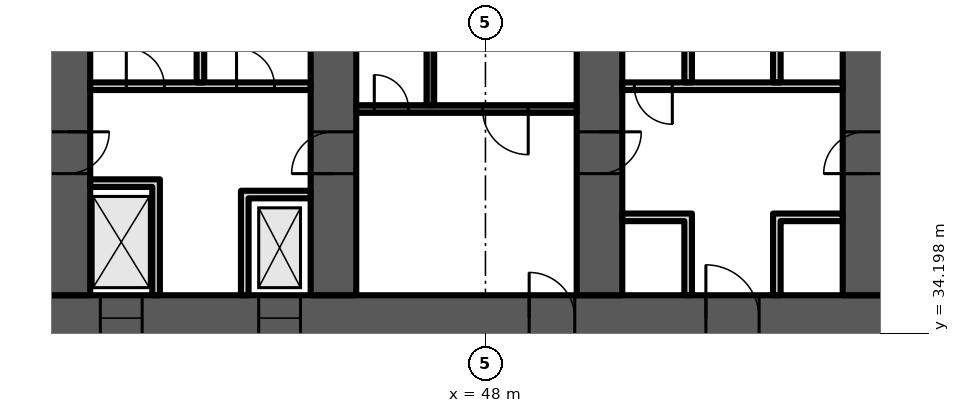
"""IFC4 building model, lengths in metres.
Left out: names, types, materials, properties, quantities, classifications, styles, units other than length and angle.
Written with IfcOpenShell. Run it as: python <this file> out.ifc"""

import sys

from ifc_helpers import new_model, si_unit, direction, frame, frame_2d, origin, place, context, subcontext, project, spatial, polyline, rectangle, outline, extrude, element, fill, save


model = new_model("IFC4")
c1 = context("Model", 3, precision=1e-05, world=origin(), true_north=direction((0.0, 1.0)))
c2 = subcontext(c1, "Body", "Model", "MODEL_VIEW")
j1 = project(units=[si_unit("LENGTHUNIT", "METRE"), si_unit("PLANEANGLEUNIT", "RADIAN")], contexts=[c1])
p1 = place(None, origin())
s1 = spatial("IfcSite", under=j1, at=p1, CompositionType="ELEMENT")
p2 = place(p1, origin())
s2 = spatial("IfcBuilding", under=s1, at=p2, CompositionType="ELEMENT")
p3 = place(p2, frame((0.0, 0.0, 91.9)))
s3 = spatial("IfcBuildingStorey", under=s2, at=p3, CompositionType="ELEMENT", Elevation=91.9)
p4 = place(p3, frame((9.0, 34.6, 0.0), z_axis=(0.0, 0.0, 1.0), x_axis=(1.0, 0.0, 0.0)))
e1 = element("IfcWall", 1, at=p4, inside=s3, PredefinedType="SHEAR", context=c2, shape_type="SweptSolid", body=[
    extrude(rectangle(XDim=56.0, YDim=1.2, at=frame_2d((28.0, 0.0))), origin(), (0.0, 0.0, 1.0), 4.8),
])
p5 = place(p4, frame((3.3, 0.0, 0.0)))
e2 = element("IfcOpeningElement", 2, at=p5, cuts=e1, PredefinedType="OPENING", context=c2, shape_type="SweptSolid", body=[
    extrude(rectangle(XDim=1.0, YDim=2.1, at=frame_2d((0.5, 1.05))), frame((0.0, 0.61, 0.0), z_axis=(0.0, -1.0, 0.0), x_axis=(1.0, 0.0, 0.0)), (0.0, 0.0, 1.0), 1.22),
])
p6 = place(p4, frame((7.867, 0.0, 0.0)))
e3 = element("IfcOpeningElement", 3, at=p6, cuts=e1, PredefinedType="OPENING", context=c2, shape_type="SweptSolid", body=[
    extrude(rectangle(XDim=1.1, YDim=2.1, at=frame_2d((0.55, 1.05))), frame((0.0, 0.61, 0.0), z_axis=(0.0, -1.0, 0.0), x_axis=(1.0, 0.0, 0.0)), (0.0, 0.0, 1.0), 1.22),
])
p7 = place(p4, frame((12.033, 0.0, 0.0)))
e4 = element("IfcOpeningElement", 4, at=p7, cuts=e1, PredefinedType="OPENING", context=c2, shape_type="SweptSolid", body=[
    extrude(rectangle(XDim=1.1, YDim=2.1, at=frame_2d((0.55, 1.05))), frame((0.0, 0.61, 0.0), z_axis=(0.0, -1.0, 0.0), x_axis=(1.0, 0.0, 0.0)), (0.0, 0.0, 1.0), 1.22),
])
p8 = place(p4, frame((9.8, 0.0, 0.0)))
e5 = element("IfcOpeningElement", 5, at=p8, cuts=e1, PredefinedType="OPENING", context=c2, shape_type="SweptSolid", body=[
    extrude(rectangle(XDim=1.4, YDim=2.1, at=frame_2d((0.7, 1.05))), frame((0.0, 0.61, 0.0), z_axis=(0.0, -1.0, 0.0), x_axis=(1.0, 0.0, 0.0)), (0.0, 0.0, 1.0), 1.22),
])
p9 = place(p4, frame((14.65, 0.0, 0.0)))
e6 = element("IfcOpeningElement", 6, at=p9, cuts=e1, PredefinedType="OPENING", context=c2, shape_type="SweptSolid", body=[
    extrude(rectangle(XDim=1.2, YDim=2.1, at=frame_2d((0.6, 1.05))), frame((0.0, 0.61, 0.0), z_axis=(0.0, -1.0, 0.0), x_axis=(1.0, 0.0, 0.0)), (0.0, 0.0, 1.0), 1.22),
])
p10 = place(p4, frame((21.867, 0.0, 0.0)))
e7 = element("IfcOpeningElement", 7, at=p10, cuts=e1, PredefinedType="OPENING", context=c2, shape_type="SweptSolid", body=[
    extrude(rectangle(XDim=1.1, YDim=2.1, at=frame_2d((0.55, 1.05))), frame((0.0, 0.61, 0.0), z_axis=(0.0, -1.0, 0.0), x_axis=(1.0, 0.0, 0.0)), (0.0, 0.0, 1.0), 1.22),
])
p11 = place(p4, frame((26.033, 0.0, 0.0)))
e8 = element("IfcOpeningElement", 8, at=p11, cuts=e1, PredefinedType="OPENING", context=c2, shape_type="SweptSolid", body=[
    extrude(rectangle(XDim=1.1, YDim=2.1, at=frame_2d((0.55, 1.05))), frame((0.0, 0.61, 0.0), z_axis=(0.0, -1.0, 0.0), x_axis=(1.0, 0.0, 0.0)), (0.0, 0.0, 1.0), 1.22),
])
p12 = place(p4, frame((23.8, 0.0, 0.0)))
e9 = element("IfcOpeningElement", 9, at=p12, cuts=e1, PredefinedType="OPENING", context=c2, shape_type="SweptSolid", body=[
    extrude(rectangle(XDim=1.4, YDim=2.1, at=frame_2d((0.7, 1.05))), frame((0.0, 0.61, 0.0), z_axis=(0.0, -1.0, 0.0), x_axis=(1.0, 0.0, 0.0)), (0.0, 0.0, 1.0), 1.22),
])
p13 = place(p4, frame((28.867, 0.0, 0.0)))
e10 = element("IfcOpeningElement", 10, at=p13, cuts=e1, PredefinedType="OPENING", context=c2, shape_type="SweptSolid", body=[
    extrude(rectangle(XDim=1.1, YDim=2.1, at=frame_2d((0.55, 1.05))), frame((0.0, 0.61, 0.0), z_axis=(0.0, -1.0, 0.0), x_axis=(1.0, 0.0, 0.0)), (0.0, 0.0, 1.0), 1.22),
])
p14 = place(p4, frame((33.033, 0.0, 0.0)))
e11 = element("IfcOpeningElement", 11, at=p14, cuts=e1, PredefinedType="OPENING", context=c2, shape_type="SweptSolid", body=[
    extrude(rectangle(XDim=1.1, YDim=2.1, at=frame_2d((0.55, 1.05))), frame((0.0, 0.61, 0.0), z_axis=(0.0, -1.0, 0.0), x_axis=(1.0, 0.0, 0.0)), (0.0, 0.0, 1.0), 1.22),
])
p15 = place(p4, frame((40.15, 0.0, 0.0)))
e12 = element("IfcOpeningElement", 12, at=p15, cuts=e1, PredefinedType="OPENING", context=c2, shape_type="SweptSolid", body=[
    extrude(rectangle(XDim=1.2, YDim=2.1, at=frame_2d((0.6, 1.05))), frame((0.0, 0.61, 0.0), z_axis=(0.0, -1.0, 0.0), x_axis=(1.0, 0.0, 0.0)), (0.0, 0.0, 1.0), 1.22),
])
p16 = place(p4, frame((44.8, 0.0, 0.0)))
e13 = element("IfcOpeningElement", 13, at=p16, cuts=e1, PredefinedType="OPENING", context=c2, shape_type="SweptSolid", body=[
    extrude(rectangle(XDim=1.4, YDim=2.1, at=frame_2d((0.7, 1.05))), frame((0.0, 0.61, 0.0), z_axis=(0.0, -1.0, 0.0), x_axis=(1.0, 0.0, 0.0)), (0.0, 0.0, 1.0), 1.22),
])
p17 = place(p4, frame((49.867, 0.0, 0.0)))
e14 = element("IfcOpeningElement", 14, at=p17, cuts=e1, PredefinedType="OPENING", context=c2, shape_type="SweptSolid", body=[
    extrude(rectangle(XDim=1.1, YDim=2.1, at=frame_2d((0.55, 1.05))), frame((0.0, 0.61, 0.0), z_axis=(0.0, -1.0, 0.0), x_axis=(1.0, 0.0, 0.0)), (0.0, 0.0, 1.0), 1.22),
])
p18 = place(p4, frame((53.5, 0.0, 0.0)))
e15 = element("IfcOpeningElement", 15, at=p18, cuts=e1, PredefinedType="OPENING", context=c2, shape_type="SweptSolid", body=[
    extrude(rectangle(XDim=1.1, YDim=2.1, at=frame_2d((0.55, 1.05))), frame((0.0, 0.61, 0.0), z_axis=(0.0, -1.0, 0.0), x_axis=(1.0, 0.0, 0.0)), (0.0, 0.0, 1.0), 1.22),
])
p19 = place(p4, frame((51.567, 0.0, 0.0)))
e16 = element("IfcOpeningElement", 16, at=p19, cuts=e1, PredefinedType="OPENING", context=c2, shape_type="SweptSolid", body=[
    extrude(rectangle(XDim=1.4, YDim=2.1, at=frame_2d((0.7, 1.05))), frame((0.0, 0.61, 0.0), z_axis=(0.0, -1.0, 0.0), x_axis=(1.0, 0.0, 0.0)), (0.0, 0.0, 1.0), 1.22),
])
p20 = place(p3, frame((37.0, 35.2, 0.0), z_axis=(0.0, 0.0, 1.0), x_axis=(0.0, 1.0, 0.0)))
e17 = element("IfcWall", 17, at=p20, inside=s3, PredefinedType="SHEAR", context=c2, shape_type="SweptSolid", body=[
    extrude(rectangle(XDim=14.78, YDim=1.2, at=frame_2d((7.39, 0.0))), origin(), (0.0, 0.0, 1.0), 4.8),
])
p21 = place(p20, frame((3.2, 0.0, 0.0)))
e18 = element("IfcOpeningElement", 18, at=p21, cuts=e17, PredefinedType="OPENING", context=c2, shape_type="SweptSolid", body=[
    extrude(rectangle(XDim=1.1, YDim=2.1, at=frame_2d((0.55, 1.05))), frame((0.0, 0.61, 0.0), z_axis=(0.0, -1.0, 0.0), x_axis=(1.0, 0.0, 0.0)), (0.0, 0.0, 1.0), 1.22),
])
p22 = place(p20, frame((9.6, 0.0, 0.0)))
e19 = element("IfcOpeningElement", 19, at=p22, cuts=e17, PredefinedType="OPENING", context=c2, shape_type="SweptSolid", body=[
    extrude(rectangle(XDim=1.0, YDim=2.1, at=frame_2d((0.5, 1.05))), frame((0.0, 0.61, 0.0), z_axis=(0.0, -1.0, 0.0), x_axis=(1.0, 0.0, 0.0)), (0.0, 0.0, 1.0), 1.22),
])
p23 = place(p3, frame((44.0, 35.2, 0.0), z_axis=(0.0, 0.0, 1.0), x_axis=(0.0, 1.0, 0.0)))
e20 = element("IfcWall", 20, at=p23, inside=s3, PredefinedType="SHEAR", context=c2, shape_type="SweptSolid", body=[
    extrude(rectangle(XDim=14.168, YDim=1.2, at=frame_2d((7.084, 0.0))), origin(), (0.0, 0.0, 1.0), 4.8),
])
p24 = place(p23, frame((3.2, 0.0, 0.0)))
e21 = element("IfcOpeningElement", 21, at=p24, cuts=e20, PredefinedType="OPENING", context=c2, shape_type="SweptSolid", body=[
    extrude(rectangle(XDim=1.1, YDim=2.1, at=frame_2d((0.55, 1.05))), frame((0.0, 0.61, 0.0), z_axis=(0.0, -1.0, 0.0), x_axis=(1.0, 0.0, 0.0)), (0.0, 0.0, 1.0), 1.22),
])
p25 = place(p23, frame((9.6, 0.0, 0.0)))
e22 = element("IfcOpeningElement", 22, at=p25, cuts=e20, PredefinedType="OPENING", context=c2, shape_type="SweptSolid", body=[
    extrude(rectangle(XDim=1.0, YDim=2.1, at=frame_2d((0.5, 1.05))), frame((0.0, 0.61, 0.0), z_axis=(0.0, -1.0, 0.0), x_axis=(1.0, 0.0, 0.0)), (0.0, 0.0, 1.0), 1.22),
])
p26 = place(p3, frame((51.0, 35.2, 0.0), z_axis=(0.0, 0.0, 1.0), x_axis=(0.0, 1.0, 0.0)))
e23 = element("IfcWall", 23, at=p26, inside=s3, PredefinedType="SHEAR", context=c2, shape_type="SweptSolid", body=[
    extrude(rectangle(XDim=13.555, YDim=1.2, at=frame_2d((6.778, 0.0))), origin(), (0.0, 0.0, 1.0), 4.8),
])
p27 = place(p26, frame((3.2, 0.0, 0.0)))
e24 = element("IfcOpeningElement", 24, at=p27, cuts=e23, PredefinedType="OPENING", context=c2, shape_type="SweptSolid", body=[
    extrude(rectangle(XDim=1.1, YDim=2.1, at=frame_2d((0.55, 1.05))), frame((0.0, 0.61, 0.0), z_axis=(0.0, -1.0, 0.0), x_axis=(1.0, 0.0, 0.0)), (0.0, 0.0, 1.0), 1.22),
])
p28 = place(p3, frame((58.0, 35.2, 0.0), z_axis=(0.0, 0.0, 1.0), x_axis=(0.0, 1.0, 0.0)))
e25 = element("IfcWall", 25, at=p28, inside=s3, PredefinedType="SHEAR", context=c2, shape_type="SweptSolid", body=[
    extrude(rectangle(XDim=12.943, YDim=1.2, at=frame_2d((6.471, 0.0))), origin(), (0.0, 0.0, 1.0), 4.8),
])
p29 = place(p28, frame((10.134, 0.0, 0.0)))
e26 = element("IfcOpeningElement", 26, at=p29, cuts=e25, PredefinedType="OPENING", context=c2, shape_type="SweptSolid", body=[
    extrude(rectangle(XDim=1.0, YDim=2.1, at=frame_2d((0.5, 1.05))), frame((0.0, 0.61, 0.0), z_axis=(0.0, -1.0, 0.0), x_axis=(1.0, 0.0, 0.0)), (0.0, 0.0, 1.0), 1.22),
])
p30 = place(p28, frame((3.2, 0.0, 0.0)))
e27 = element("IfcOpeningElement", 27, at=p30, cuts=e25, PredefinedType="OPENING", context=c2, shape_type="SweptSolid", body=[
    extrude(rectangle(XDim=1.1, YDim=2.1, at=frame_2d((0.55, 1.05))), frame((0.0, 0.61, 0.0), z_axis=(0.0, -1.0, 0.0), x_axis=(1.0, 0.0, 0.0)), (0.0, 0.0, 1.0), 1.22),
])
p31 = place(p3, frame((37.6, 40.7, 0.0), z_axis=(0.0, 0.0, 1.0), x_axis=(1.0, 0.0, 0.0)))
e28 = element("IfcWall", 28, at=p31, inside=s3, PredefinedType="PARTITIONING", context=c2, shape_type="SweptSolid", body=[
    extrude(rectangle(XDim=5.8, YDim=0.2, at=frame_2d((2.9, 0.0))), origin(), (0.0, 0.0, 1.0), 4.4),
])
p32 = place(p31, frame((0.95, 0.0, 0.0)))
e29 = element("IfcOpeningElement", 29, at=p32, cuts=e28, PredefinedType="OPENING", context=c2, shape_type="SweptSolid", body=[
    extrude(rectangle(XDim=1.0, YDim=2.1, at=frame_2d((0.5, 1.05))), frame((0.0, 0.11, 0.0), z_axis=(0.0, -1.0, 0.0), x_axis=(1.0, 0.0, 0.0)), (0.0, 0.0, 1.0), 0.22),
])
p33 = place(p31, frame((3.85, 0.0, 0.0)))
e30 = element("IfcOpeningElement", 30, at=p33, cuts=e28, PredefinedType="OPENING", context=c2, shape_type="SweptSolid", body=[
    extrude(rectangle(XDim=1.0, YDim=2.1, at=frame_2d((0.5, 1.05))), frame((0.0, 0.11, 0.0), z_axis=(0.0, -1.0, 0.0), x_axis=(1.0, 0.0, 0.0)), (0.0, 0.0, 1.0), 0.22),
])
p34 = place(p3, origin())
e31 = element("IfcWall", 31, at=p34, inside=s3, PredefinedType="PARTITIONING", context=c2, shape_type="SweptSolid", body=[
    extrude(outline(polyline([(41.567, 37.95), (41.767, 37.95), (43.4, 37.95), (43.4, 37.75), (41.767, 37.75), (41.767, 35.2), (41.567, 35.2), (41.567, 37.95)])), origin(), (0.0, 0.0, 1.0), 4.4),
])
p35 = place(p3, origin())
e32 = element("IfcWall", 32, at=p35, inside=s3, PredefinedType="PARTITIONING", context=c2, shape_type="SweptSolid", body=[
    extrude(outline(polyline([(39.233, 38.05), (37.6, 38.05), (37.6, 38.25), (39.233, 38.25), (39.433, 38.25), (39.433, 35.2), (39.233, 35.2), (39.233, 38.05)])), origin(), (0.0, 0.0, 1.0), 4.4),
])
p36 = place(p3, frame((40.5, 40.8, 0.0), z_axis=(0.0, 0.0, 1.0), x_axis=(0.0, 1.0, 0.0)))
e33 = element("IfcWall", 33, at=p36, inside=s3, PredefinedType="PARTITIONING", context=c2, shape_type="SweptSolid", body=[
    extrude(rectangle(XDim=8.653, YDim=0.2, at=frame_2d((4.326, 0.0))), origin(), (0.0, 0.0, 1.0), 4.4),
])
p37 = place(p3, frame((44.6, 40.1, 0.0), z_axis=(0.0, 0.0, 1.0), x_axis=(1.0, 0.0, 0.0)))
e34 = element("IfcWall", 34, at=p37, inside=s3, PredefinedType="SHEAR", context=c2, shape_type="SweptSolid", body=[
    extrude(rectangle(XDim=5.8, YDim=0.2, at=frame_2d((2.9, 0.0))), origin(), (0.0, 0.0, 1.0), 4.4),
])
p38 = place(p37, frame((3.325, 0.0, 0.0)))
e35 = element("IfcOpeningElement", 35, at=p38, cuts=e34, PredefinedType="OPENING", context=c2, shape_type="SweptSolid", body=[
    extrude(rectangle(XDim=1.2, YDim=2.1, at=frame_2d((0.6, 1.05))), frame((0.0, 0.11, 0.0), z_axis=(0.0, -1.0, 0.0), x_axis=(1.0, 0.0, 0.0)), (0.0, 0.0, 1.0), 0.22),
])
p39 = place(p37, frame((0.475, 0.0, 0.0)))
e36 = element("IfcOpeningElement", 36, at=p39, cuts=e34, PredefinedType="OPENING", context=c2, shape_type="SweptSolid", body=[
    extrude(rectangle(XDim=0.9, YDim=2.1, at=frame_2d((0.45, 1.05))), frame((0.0, 0.11, 0.0), z_axis=(0.0, -1.0, 0.0), x_axis=(1.0, 0.0, 0.0)), (0.0, 0.0, 1.0), 0.22),
])
p40 = place(p3, frame((46.55, 40.2, 0.0), z_axis=(0.0, 0.0, 1.0), x_axis=(0.0, 1.0, 0.0)))
e37 = element("IfcWall", 37, at=p40, inside=s3, PredefinedType="SHEAR", context=c2, shape_type="SweptSolid", body=[
    extrude(rectangle(XDim=7.2, YDim=0.2, at=frame_2d((3.6, 0.0))), origin(), (0.0, 0.0, 1.0), 4.4),
])
p41 = place(p3, frame((51.6, 40.7, 0.0), z_axis=(0.0, 0.0, 1.0), x_axis=(1.0, 0.0, 0.0)))
e38 = element("IfcWall", 38, at=p41, inside=s3, PredefinedType="PARTITIONING", context=c2, shape_type="SweptSolid", body=[
    extrude(rectangle(XDim=5.8, YDim=0.2, at=frame_2d((2.9, 0.0))), origin(), (0.0, 0.0, 1.0), 4.4),
])
p42 = place(p41, frame((0.317, 0.0, 0.0)))
e39 = element("IfcOpeningElement", 39, at=p42, cuts=e38, PredefinedType="OPENING", context=c2, shape_type="SweptSolid", body=[
    extrude(rectangle(XDim=1.0, YDim=2.1, at=frame_2d((0.5, 1.05))), frame((0.0, 0.11, 0.0), z_axis=(0.0, -1.0, 0.0), x_axis=(1.0, 0.0, 0.0)), (0.0, 0.0, 1.0), 0.22),
])
p43 = place(p3, origin())
e40 = element("IfcWall", 40, at=p43, inside=s3, PredefinedType="PARTITIONING", context=c2, shape_type="SweptSolid", body=[
    extrude(outline(polyline([(53.233, 37.15), (51.6, 37.15), (51.6, 37.35), (53.233, 37.35), (53.433, 37.35), (53.433, 35.2), (53.233, 35.2), (53.233, 37.15)])), origin(), (0.0, 0.0, 1.0), 4.4),
])
p44 = place(p3, origin())
e41 = element("IfcWall", 41, at=p44, inside=s3, PredefinedType="PARTITIONING", context=c2, shape_type="SweptSolid", body=[
    extrude(outline(polyline([(55.567, 37.35), (55.767, 37.35), (57.4, 37.35), (57.4, 37.15), (55.767, 37.15), (55.767, 35.2), (55.567, 35.2), (55.567, 37.35)])), origin(), (0.0, 0.0, 1.0), 4.4),
])
p45 = place(p3, origin())
e42 = element("IfcWall", 42, at=p45, inside=s3, PredefinedType="PARTITIONING", context=c2, shape_type="SweptSolid", body=[
    extrude(outline(polyline([(53.233, 40.8), (53.233, 43.8), (53.433, 43.8), (53.433, 40.8), (53.233, 40.8)])), origin(), (0.0, 0.0, 1.0), 4.4),
])
p46 = place(p3, origin())
e43 = element("IfcWall", 43, at=p46, inside=s3, PredefinedType="PARTITIONING", context=c2, shape_type="SweptSolid", body=[
    extrude(outline(polyline([(55.567, 40.8), (55.567, 43.8), (55.767, 43.8), (55.767, 40.8), (55.567, 40.8)])), origin(), (0.0, 0.0, 1.0), 4.4),
])
p47 = place(p13, origin())
e44 = element("IfcDoor", 44, at=p47, inside=s3, OperationType="DOUBLE_DOOR_SLIDING", PredefinedType="DOOR", context=c2, shape_type="SweptSolid", body=[
    extrude(rectangle(XDim=1.1, YDim=2.1, at=frame_2d((0.55, 1.05))), frame((0.0, 0.025, 0.0), z_axis=(0.0, -1.0, 0.0), x_axis=(1.0, 0.0, 0.0)), (0.0, 0.0, 1.0), 0.05),
])
fill(e10, e44)
p48 = place(p14, origin())
e45 = element("IfcDoor", 45, at=p48, inside=s3, OperationType="DOUBLE_DOOR_SLIDING", PredefinedType="DOOR", context=c2, shape_type="SweptSolid", body=[
    extrude(rectangle(XDim=1.1, YDim=2.1, at=frame_2d((0.55, 1.05))), frame((0.0, 0.025, 0.0), z_axis=(0.0, -1.0, 0.0), x_axis=(1.0, 0.0, 0.0)), (0.0, 0.0, 1.0), 0.05),
])
fill(e11, e45)
p49 = place(p32, origin())
e46 = element("IfcDoor", 46, at=p49, inside=s3, OperationType="SINGLE_SWING_LEFT", PredefinedType="DOOR", context=c2, shape_type="SweptSolid", body=[
    extrude(rectangle(XDim=1.0, YDim=2.1, at=frame_2d((0.5, 1.05))), frame((0.0, 0.025, 0.0), z_axis=(0.0, -1.0, 0.0), x_axis=(1.0, 0.0, 0.0)), (0.0, 0.0, 1.0), 0.05),
])
fill(e29, e46)
p50 = place(p33, origin())
e47 = element("IfcDoor", 47, at=p50, inside=s3, OperationType="SINGLE_SWING_LEFT", PredefinedType="DOOR", context=c2, shape_type="SweptSolid", body=[
    extrude(rectangle(XDim=1.0, YDim=2.1, at=frame_2d((0.5, 1.05))), frame((0.0, 0.025, 0.0), z_axis=(0.0, -1.0, 0.0), x_axis=(1.0, 0.0, 0.0)), (0.0, 0.0, 1.0), 0.05),
])
fill(e30, e47)
p51 = place(p38, origin())
e48 = element("IfcDoor", 48, at=p51, inside=s3, OperationType="SINGLE_SWING_RIGHT", PredefinedType="DOOR", context=c2, shape_type="SweptSolid", body=[
    extrude(rectangle(XDim=1.2, YDim=2.1, at=frame_2d((0.6, 1.05))), frame((0.0, 0.025, 0.0), z_axis=(0.0, -1.0, 0.0), x_axis=(1.0, 0.0, 0.0)), (0.0, 0.0, 1.0), 0.05),
])
fill(e35, e48)
p52 = place(p39, origin())
e49 = element("IfcDoor", 49, at=p52, inside=s3, OperationType="SINGLE_SWING_LEFT", PredefinedType="DOOR", context=c2, shape_type="SweptSolid", body=[
    extrude(rectangle(XDim=0.9, YDim=2.1, at=frame_2d((0.45, 1.05))), frame((0.0, 0.025, 0.0), z_axis=(0.0, -1.0, 0.0), x_axis=(1.0, 0.0, 0.0)), (0.0, 0.0, 1.0), 0.05),
])
fill(e36, e49)
p53 = place(p15, origin())
e50 = element("IfcDoor", 50, at=p53, inside=s3, OperationType="SINGLE_SWING_LEFT", PredefinedType="DOOR", context=c2, shape_type="SweptSolid", body=[
    extrude(rectangle(XDim=1.2, YDim=2.1, at=frame_2d((0.6, 1.05))), frame((0.0, 0.025, 0.0), z_axis=(0.0, -1.0, 0.0), x_axis=(1.0, 0.0, 0.0)), (0.0, 0.0, 1.0), 0.05),
])
fill(e12, e50)
p54 = place(p16, origin())
e51 = element("IfcDoor", 51, at=p54, inside=s3, OperationType="DOUBLE_DOOR_SINGLE_SWING", PredefinedType="DOOR", context=c2, shape_type="SweptSolid", body=[
    extrude(rectangle(XDim=1.4, YDim=2.1, at=frame_2d((0.7, 1.05))), frame((0.0, 0.025, 0.0), z_axis=(0.0, -1.0, 0.0), x_axis=(1.0, 0.0, 0.0)), (0.0, 0.0, 1.0), 0.05),
])
fill(e13, e51)
p55 = place(p42, origin())
e52 = element("IfcDoor", 52, at=p55, inside=s3, OperationType="SINGLE_SWING_RIGHT", PredefinedType="DOOR", context=c2, shape_type="SweptSolid", body=[
    extrude(rectangle(XDim=1.0, YDim=2.1, at=frame_2d((0.5, 1.05))), frame((0.0, 0.025, 0.0), z_axis=(0.0, -1.0, 0.0), x_axis=(1.0, 0.0, 0.0)), (0.0, 0.0, 1.0), 0.05),
])
fill(e39, e52)
p56 = place(p21, origin())
e53 = element("IfcDoor", 53, at=p56, inside=s3, OperationType="SINGLE_SWING_RIGHT", PredefinedType="DOOR", context=c2, shape_type="SweptSolid", body=[
    extrude(rectangle(XDim=1.1, YDim=2.1, at=frame_2d((0.55, 1.05))), frame((0.0, 0.025, 0.0), z_axis=(0.0, -1.0, 0.0), x_axis=(1.0, 0.0, 0.0)), (0.0, 0.0, 1.0), 0.05),
])
fill(e18, e53)
p57 = place(p24, origin())
e54 = element("IfcDoor", 54, at=p57, inside=s3, OperationType="SINGLE_SWING_LEFT", PredefinedType="DOOR", context=c2, shape_type="SweptSolid", body=[
    extrude(rectangle(XDim=1.1, YDim=2.1, at=frame_2d((0.55, 1.05))), frame((0.0, 0.025, 0.0), z_axis=(0.0, -1.0, 0.0), x_axis=(1.0, 0.0, 0.0)), (0.0, 0.0, 1.0), 0.05),
])
fill(e21, e54)
p58 = place(p27, origin())
e55 = element("IfcDoor", 55, at=p58, inside=s3, OperationType="SINGLE_SWING_RIGHT", PredefinedType="DOOR", context=c2, shape_type="SweptSolid", body=[
    extrude(rectangle(XDim=1.1, YDim=2.1, at=frame_2d((0.55, 1.05))), frame((0.0, 0.025, 0.0), z_axis=(0.0, -1.0, 0.0), x_axis=(1.0, 0.0, 0.0)), (0.0, 0.0, 1.0), 0.05),
])
fill(e24, e55)
p59 = place(p30, origin())
e56 = element("IfcDoor", 56, at=p59, inside=s3, OperationType="SINGLE_SWING_LEFT", PredefinedType="DOOR", context=c2, shape_type="SweptSolid", body=[
    extrude(rectangle(XDim=1.1, YDim=2.1, at=frame_2d((0.55, 1.05))), frame((0.0, 0.025, 0.0), z_axis=(0.0, -1.0, 0.0), x_axis=(1.0, 0.0, 0.0)), (0.0, 0.0, 1.0), 0.05),
])
fill(e27, e56)
save(model, sys.argv[1])
